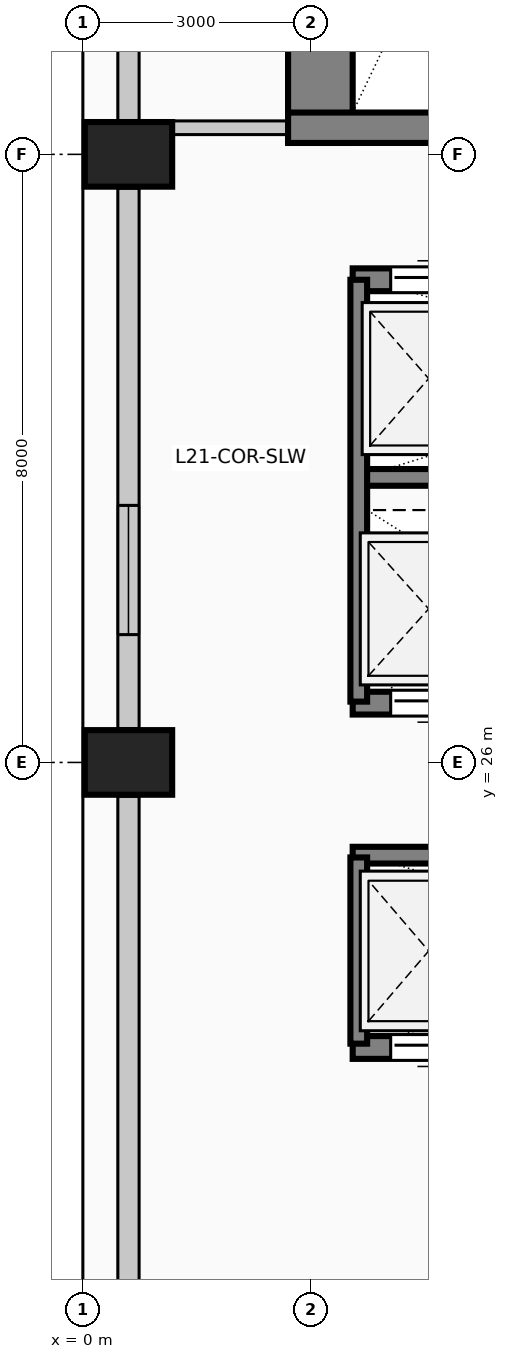
"""IFC4 building model, lengths in metres.
Left out: names, types, materials, properties, quantities, classifications, styles, units other than length and angle.
Written with IfcOpenShell. Run it as: python <this file> out.ifc"""

import sys

from ifc_helpers import new_model, si_unit, direction, frame, frame_2d, origin, origin_2d, place, context, subcontext, project, spatial, rectangle, extrude, element, fill, save


model = new_model("IFC4")
c1 = context("Model", 3, precision=1e-05, world=origin(), true_north=direction((0.0, 1.0)))
c2 = subcontext(c1, "Body", "Model", "MODEL_VIEW")
j1 = project(units=[si_unit("LENGTHUNIT", "METRE"), si_unit("PLANEANGLEUNIT", "RADIAN")], contexts=[c1])
p1 = place(None, origin())
s1 = spatial("IfcSite", under=j1, at=p1, CompositionType="ELEMENT")
p2 = place(p1, origin())
s2 = spatial("IfcBuilding", under=s1, at=p2, CompositionType="ELEMENT")
p3 = place(p2, frame((0.0, 0.0, 87.8)))
s3 = spatial("IfcBuildingStorey", under=s2, at=p3, CompositionType="ELEMENT", Elevation=87.8)
p4 = place(p3, frame((3.125, 34.15, 0.0), z_axis=(0.0, 0.0, 1.0), x_axis=(0.0, 1.0, 0.0)))
e1 = element("IfcWall", 1, at=p4, inside=s3, PredefinedType="SHEAR", context=c2, shape_type="SweptSolid", body=[
    extrude(rectangle(XDim=9.13, YDim=0.85, at=frame_2d((4.565, 0.0))), origin(), (0.0, 0.0, 1.0), 4.8),
])
p5 = place(p3, frame((2.7, 34.35, 0.0), z_axis=(0.0, 0.0, 1.0), x_axis=(1.0, 0.0, 0.0)))
e2 = element("IfcWall", 2, at=p5, inside=s3, PredefinedType="SHEAR", context=c2, shape_type="SweptSolid", body=[
    extrude(rectangle(XDim=5.01, YDim=0.4, at=frame_2d((2.505, 0.0))), origin(), (0.0, 0.0, 1.0), 4.8),
])
p6 = place(p5, frame((2.4, 0.0, 0.0)))
e3 = element("IfcOpeningElement", 3, at=p6, cuts=e2, PredefinedType="OPENING", context=c2, shape_type="SweptSolid", body=[
    extrude(rectangle(XDim=1.15, YDim=2.2, at=frame_2d((0.575, 1.1))), frame((0.0, 0.21, 0.0), z_axis=(0.0, -1.0, 0.0), x_axis=(1.0, 0.0, 0.0)), (0.0, 0.0, 1.0), 0.42),
])
for number, where, z_axis, x_axis in (
    (4, (0.6, 26.0, 0.0), (0.0, 0.0, 1.0), (0.0, 1.0, 0.0)),
    (5, (0.6, 34.0, 0.0), (0.0, 0.0, 1.0), (0.0, 1.0, 0.0)),
):
    element("IfcColumn", number, at=place(p3, frame(where, z_axis=z_axis, x_axis=x_axis)), inside=s3, PredefinedType="COLUMN", context=c2, shape_type="SweptSolid", body=[
        extrude(rectangle(XDim=0.85, YDim=1.15, at=origin_2d()), origin(), (0.0, 0.0, 1.0), 4.8),
    ])
p7 = place(p3, frame((0.6, 18.445, 0.0), z_axis=(0.0, 0.0, 1.0), x_axis=(0.0, 1.0, 0.0)))
e6 = element("IfcWall", 6, at=p7, inside=s3, PredefinedType="SOLIDWALL", context=c2, shape_type="SweptSolid", body=[
    extrude(rectangle(XDim=7.11, YDim=0.28, at=frame_2d((3.555, 0.0))), origin(), (0.0, 0.0, 1.0), 3.675),
])
p8 = place(p3, frame((0.6, 26.445, 0.0), z_axis=(0.0, 0.0, 1.0), x_axis=(0.0, 1.0, 0.0)))
e7 = element("IfcWall", 7, at=p8, inside=s3, PredefinedType="SOLIDWALL", context=c2, shape_type="SweptSolid", body=[
    extrude(rectangle(XDim=7.11, YDim=0.28, at=frame_2d((3.555, 0.0))), origin(), (0.0, 0.0, 1.0), 3.675),
])
p9 = place(p8, frame((1.237, 0.0, 0.5)))
e8 = element("IfcOpeningElement", 8, at=p9, cuts=e7, PredefinedType="OPENING", context=c2, shape_type="SweptSolid", body=[
    extrude(rectangle(XDim=1.7, YDim=1.95, at=frame_2d((0.85, 0.975))), frame((0.0, 0.15, 0.0), z_axis=(0.0, -1.0, 0.0), x_axis=(1.0, 0.0, 0.0)), (0.0, 0.0, 1.0), 0.3),
])
p10 = place(p3, frame((0.6, 34.445, 0.0), z_axis=(0.0, 0.0, 1.0), x_axis=(0.0, 1.0, 0.0)))
e9 = element("IfcWall", 9, at=p10, inside=s3, PredefinedType="SOLIDWALL", context=c2, shape_type="SweptSolid", body=[
    extrude(rectangle(XDim=7.51, YDim=0.28, at=frame_2d((3.755, 0.0))), origin(), (0.0, 0.0, 1.0), 3.675),
])
p11 = place(p3, frame((5.65, 22.25, 0.0), z_axis=(0.0, 0.0, 1.0), x_axis=(-1.0, 0.0, 0.0)))
e10 = element("IfcWall", 10, at=p11, inside=s3, PredefinedType="SOLIDWALL", context=c2, shape_type="SweptSolid", body=[
    extrude(rectangle(XDim=2.1, YDim=0.3, at=frame_2d((1.05, 0.0))), origin(), (0.0, 0.0, 1.0), 4.8),
])
p12 = place(p11, frame((0.5, 0.0, 0.0)))
e11 = element("IfcOpeningElement", 11, at=p12, cuts=e10, PredefinedType="OPENING", context=c2, shape_type="SweptSolid", body=[
    extrude(rectangle(XDim=1.1, YDim=2.2, at=frame_2d((0.55, 1.1))), frame((0.0, 0.16, 0.0), z_axis=(0.0, -1.0, 0.0), x_axis=(1.0, 0.0, 0.0)), (0.0, 0.0, 1.0), 0.32),
])
p13 = place(p3, frame((3.55, 32.35, 0.0), z_axis=(0.0, 0.0, 1.0), x_axis=(1.0, 0.0, 0.0)))
e12 = element("IfcWall", 12, at=p13, inside=s3, PredefinedType="SOLIDWALL", context=c2, shape_type="SweptSolid", body=[
    extrude(rectangle(XDim=2.1, YDim=0.3, at=frame_2d((1.05, 0.0))), origin(), (0.0, 0.0, 1.0), 4.8),
])
p14 = place(p13, frame((0.5, 0.0, 0.0)))
e13 = element("IfcOpeningElement", 13, at=p14, cuts=e12, PredefinedType="OPENING", context=c2, shape_type="SweptSolid", body=[
    extrude(rectangle(XDim=1.1, YDim=2.2, at=frame_2d((0.55, 1.1))), frame((0.0, 0.16, 0.0), z_axis=(0.0, -1.0, 0.0), x_axis=(1.0, 0.0, 0.0)), (0.0, 0.0, 1.0), 0.32),
])
p15 = place(p3, frame((5.65, 26.78, 0.0), z_axis=(0.0, 0.0, 1.0), x_axis=(-1.0, 0.0, 0.0)))
e14 = element("IfcWall", 14, at=p15, inside=s3, PredefinedType="SOLIDWALL", context=c2, shape_type="SweptSolid", body=[
    extrude(rectangle(XDim=2.1, YDim=0.3, at=frame_2d((1.05, 0.0))), origin(), (0.0, 0.0, 1.0), 4.8),
])
p16 = place(p15, frame((0.5, 0.0, 0.0)))
e15 = element("IfcOpeningElement", 15, at=p16, cuts=e14, PredefinedType="OPENING", context=c2, shape_type="SweptSolid", body=[
    extrude(rectangle(XDim=1.1, YDim=2.2, at=frame_2d((0.55, 1.1))), frame((0.0, 0.16, 0.0), z_axis=(0.0, -1.0, 0.0), x_axis=(1.0, 0.0, 0.0)), (0.0, 0.0, 1.0), 0.32),
])
p17 = place(p3, frame((3.55, 29.75, 0.0), z_axis=(0.0, 0.0, 1.0), x_axis=(1.0, 0.0, 0.0)))
e16 = element("IfcWall", 16, at=p17, inside=s3, PredefinedType="SOLIDWALL", context=c2, shape_type="SweptSolid", body=[
    extrude(rectangle(XDim=8.65, YDim=0.22, at=frame_2d((4.325, 0.0))), origin(), (0.0, 0.0, 1.0), 4.8),
])
p18 = place(p3, frame((3.63, 26.8, 0.0), z_axis=(0.0, 0.0, 1.0), x_axis=(0.0, 1.0, 0.0)))
e17 = element("IfcWall", 17, at=p18, inside=s3, PredefinedType="SOLIDWALL", context=c2, shape_type="SweptSolid", body=[
    extrude(rectangle(XDim=5.55, YDim=0.22, at=frame_2d((2.775, 0.0))), origin(), (0.0, 0.0, 1.0), 4.8),
])
p19 = place(p3, frame((3.55, 24.78, 0.0), z_axis=(0.0, 0.0, 1.0), x_axis=(1.0, 0.0, 0.0)))
e18 = element("IfcWall", 18, at=p19, inside=s3, PredefinedType="SOLIDWALL", context=c2, shape_type="SweptSolid", body=[
    extrude(rectangle(XDim=8.65, YDim=0.22, at=frame_2d((4.325, 0.0))), origin(), (0.0, 0.0, 1.0), 4.8),
])
p20 = place(p3, frame((3.63, 22.3, 0.0), z_axis=(0.0, 0.0, 1.0), x_axis=(0.0, 1.0, 0.0)))
e19 = element("IfcWall", 19, at=p20, inside=s3, PredefinedType="SOLIDWALL", context=c2, shape_type="SweptSolid", body=[
    extrude(rectangle(XDim=2.45, YDim=0.22, at=frame_2d((1.225, 0.0))), origin(), (0.0, 0.0, 1.0), 4.8),
])
p21 = place(p3, frame((1.175, 34.35, 0.0), z_axis=(0.0, 0.0, 1.0), x_axis=(1.0, 0.0, 0.0)))
e20 = element("IfcWall", 20, at=p21, inside=s3, PredefinedType="PARTITIONING", context=c2, shape_type="SweptSolid", body=[
    extrude(rectangle(XDim=1.525, YDim=0.18, at=frame_2d((0.762, 0.0))), origin(), (0.0, 0.0, 1.0), 4.525),
])
p22 = place(p9, origin())
e21 = element("IfcWindow", 21, at=p22, inside=s3, PartitioningType="SINGLE_PANEL", PredefinedType="WINDOW", context=c2, shape_type="SweptSolid", body=[
    extrude(rectangle(XDim=1.7, YDim=1.95, at=frame_2d((0.85, 0.975))), frame((0.0, 0.03, 0.0), z_axis=(0.0, -1.0, 0.0), x_axis=(1.0, 0.0, 0.0)), (0.0, 0.0, 1.0), 0.06),
])
fill(e8, e21)
p23 = place(p12, origin())
e22 = element("IfcDoor", 22, at=p23, inside=s3, OperationType="SLIDING_TO_LEFT", PredefinedType="DOOR", context=c2, shape_type="SweptSolid", body=[
    extrude(rectangle(XDim=1.1, YDim=2.2, at=frame_2d((0.55, 1.1))), frame((0.0, 0.025, 0.0), z_axis=(0.0, -1.0, 0.0), x_axis=(1.0, 0.0, 0.0)), (0.0, 0.0, 1.0), 0.05),
])
fill(e11, e22)
p24 = place(p14, origin())
e23 = element("IfcDoor", 23, at=p24, inside=s3, OperationType="SLIDING_TO_LEFT", PredefinedType="DOOR", context=c2, shape_type="SweptSolid", body=[
    extrude(rectangle(XDim=1.1, YDim=2.2, at=frame_2d((0.55, 1.1))), frame((0.0, 0.025, 0.0), z_axis=(0.0, -1.0, 0.0), x_axis=(1.0, 0.0, 0.0)), (0.0, 0.0, 1.0), 0.05),
])
fill(e13, e23)
p25 = place(p16, origin())
e24 = element("IfcDoor", 24, at=p25, inside=s3, OperationType="SLIDING_TO_LEFT", PredefinedType="DOOR", context=c2, shape_type="SweptSolid", body=[
    extrude(rectangle(XDim=1.1, YDim=2.2, at=frame_2d((0.55, 1.1))), frame((0.0, 0.025, 0.0), z_axis=(0.0, -1.0, 0.0), x_axis=(1.0, 0.0, 0.0)), (0.0, 0.0, 1.0), 0.05),
])
fill(e15, e24)
save(model, sys.argv[1])
